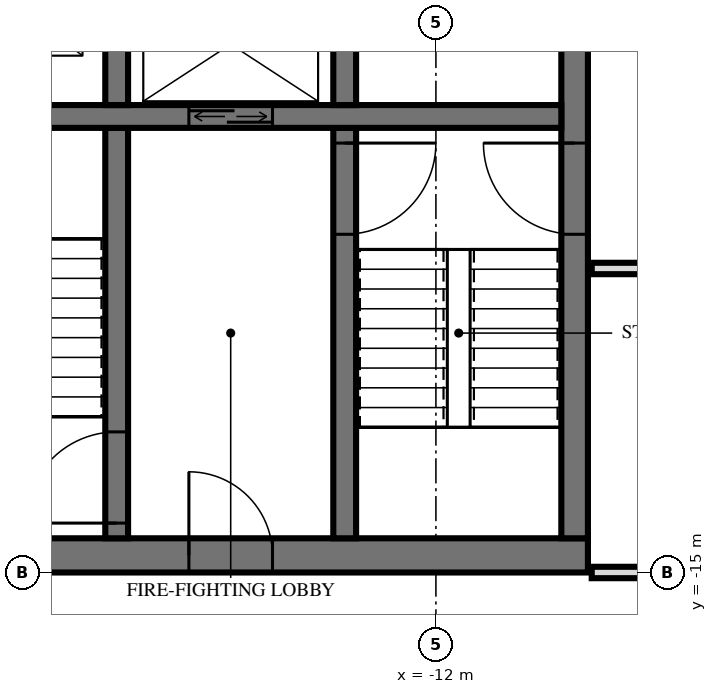
"""IFC4 building model, lengths in metres.
Left out: names, types, materials, properties, quantities, classifications, styles, units other than length and angle.
Written with IfcOpenShell. Run it as: python <this file> out.ifc"""

import sys

from ifc_helpers import new_model, si_unit, direction, frame, frame_2d, origin, place, context, subcontext, project, spatial, rectangle, extrude, element, fill, save


model = new_model("IFC4")
c1 = context("Model", 3, precision=1e-05, world=origin(), true_north=direction((0.0, 1.0)))
c2 = subcontext(c1, "Body", "Model", "MODEL_VIEW")
j1 = project(units=[si_unit("LENGTHUNIT", "METRE"), si_unit("PLANEANGLEUNIT", "RADIAN")], contexts=[c1])
p1 = place(None, origin())
s1 = spatial("IfcSite", under=j1, at=p1, CompositionType="ELEMENT")
p2 = place(p1, origin())
s2 = spatial("IfcBuilding", under=s1, at=p2, CompositionType="ELEMENT")
p3 = place(p2, frame((0.0, 0.0, 99.6)))
s3 = spatial("IfcBuildingStorey", under=s2, at=p3, CompositionType="ELEMENT", Elevation=99.6)
p4 = place(p3, frame((-29.5, -14.775, 0.0), z_axis=(0.0, 0.0, 1.0), x_axis=(1.0, 0.0, 0.0)))
e1 = element("IfcWall", 1, at=p4, inside=s3, PredefinedType="SHEAR", context=c2, shape_type="SweptSolid", body=[
    extrude(rectangle(XDim=19.5, YDim=0.45, at=frame_2d((9.75, 0.0))), origin(), (0.0, 0.0, 1.0), 3.6),
])
p5 = place(p4, frame((11.2, 0.0, 0.0)))
e2 = element("IfcOpeningElement", 2, at=p5, cuts=e1, PredefinedType="OPENING", context=c2, shape_type="SweptSolid", body=[
    extrude(rectangle(XDim=1.2, YDim=2.1, at=frame_2d((0.6, 1.05))), frame((0.0, 0.235, 0.0), z_axis=(0.0, -1.0, 0.0), x_axis=(1.0, 0.0, 0.0)), (0.0, 0.0, 1.0), 0.47),
])
p6 = place(p4, frame((14.25, 0.0, 0.0)))
e3 = element("IfcOpeningElement", 3, at=p6, cuts=e1, PredefinedType="OPENING", context=c2, shape_type="SweptSolid", body=[
    extrude(rectangle(XDim=1.1, YDim=2.1, at=frame_2d((0.55, 1.05))), frame((0.0, 0.235, 0.0), z_axis=(0.0, -1.0, 0.0), x_axis=(1.0, 0.0, 0.0)), (0.0, 0.0, 1.0), 0.47),
])
p7 = place(p4, frame((8.5, 0.0, 0.0)))
e4 = element("IfcOpeningElement", 4, at=p7, cuts=e1, PredefinedType="OPENING", context=c2, shape_type="SweptSolid", body=[
    extrude(rectangle(XDim=0.9, YDim=2.1, at=frame_2d((0.45, 1.05))), frame((0.0, 0.235, 0.0), z_axis=(0.0, -1.0, 0.0), x_axis=(1.0, 0.0, 0.0)), (0.0, 0.0, 1.0), 0.47),
])
p8 = place(p4, frame((6.05, 0.0, 0.0)))
e5 = element("IfcOpeningElement", 5, at=p8, cuts=e1, PredefinedType="OPENING", context=c2, shape_type="SweptSolid", body=[
    extrude(rectangle(XDim=1.0, YDim=2.1, at=frame_2d((0.5, 1.05))), frame((0.0, 0.235, 0.0), z_axis=(0.0, -1.0, 0.0), x_axis=(1.0, 0.0, 0.0)), (0.0, 0.0, 1.0), 0.47),
])
p9 = place(p4, frame((3.413, 0.0, 0.0)))
e6 = element("IfcOpeningElement", 6, at=p9, cuts=e1, PredefinedType="OPENING", context=c2, shape_type="SweptSolid", body=[
    extrude(rectangle(XDim=1.0, YDim=2.1, at=frame_2d((0.5, 1.05))), frame((0.0, 0.235, 0.0), z_axis=(0.0, -1.0, 0.0), x_axis=(1.0, 0.0, 0.0)), (0.0, 0.0, 1.0), 0.47),
])
p10 = place(p4, frame((1.087, 0.0, 0.0)))
e7 = element("IfcOpeningElement", 7, at=p10, cuts=e1, PredefinedType="OPENING", context=c2, shape_type="SweptSolid", body=[
    extrude(rectangle(XDim=1.0, YDim=2.1, at=frame_2d((0.5, 1.05))), frame((0.0, 0.235, 0.0), z_axis=(0.0, -1.0, 0.0), x_axis=(1.0, 0.0, 0.0)), (0.0, 0.0, 1.0), 0.47),
])
p11 = place(p3, frame((-10.175, -14.55, 0.0), z_axis=(0.0, 0.0, 1.0), x_axis=(0.0, 1.0, 0.0)))
e8 = element("IfcWall", 8, at=p11, inside=s3, PredefinedType="SHEAR", context=c2, shape_type="SweptSolid", body=[
    extrude(rectangle(XDim=14.1, YDim=0.35, at=frame_2d((7.05, 0.0))), origin(), (0.0, 0.0, 1.0), 3.6),
])
p12 = place(p11, frame((8.4, 0.0, 0.0)))
e9 = element("IfcOpeningElement", 9, at=p12, cuts=e8, PredefinedType="OPENING", context=c2, shape_type="SweptSolid", body=[
    extrude(rectangle(XDim=1.4, YDim=2.4, at=frame_2d((0.7, 1.2))), frame((0.0, 0.185, 0.0), z_axis=(0.0, -1.0, 0.0), x_axis=(1.0, 0.0, 0.0)), (0.0, 0.0, 1.0), 0.37),
])
p13 = place(p11, frame((10.0, 0.0, 0.0)))
e10 = element("IfcOpeningElement", 10, at=p13, cuts=e8, PredefinedType="OPENING", context=c2, shape_type="SweptSolid", body=[
    extrude(rectangle(XDim=1.4, YDim=2.4, at=frame_2d((0.7, 1.2))), frame((0.0, 0.185, 0.0), z_axis=(0.0, -1.0, 0.0), x_axis=(1.0, 0.0, 0.0)), (0.0, 0.0, 1.0), 0.37),
])
p14 = place(p11, frame((4.0, 0.0, 0.0)))
e11 = element("IfcOpeningElement", 11, at=p14, cuts=e8, PredefinedType="OPENING", context=c2, shape_type="SweptSolid", body=[
    extrude(rectangle(XDim=1.2, YDim=2.1, at=frame_2d((0.6, 1.05))), frame((0.0, 0.185, 0.0), z_axis=(0.0, -1.0, 0.0), x_axis=(1.0, 0.0, 0.0)), (0.0, 0.0, 1.0), 0.37),
])
p15 = place(p3, frame((-29.05, -9.0, 0.0), z_axis=(0.0, 0.0, 1.0), x_axis=(1.0, 0.0, 0.0)))
e12 = element("IfcWall", 12, at=p15, inside=s3, PredefinedType="SHEAR", context=c2, shape_type="SweptSolid", body=[
    extrude(rectangle(XDim=18.7, YDim=0.3, at=frame_2d((9.35, 0.0))), origin(), (0.0, 0.0, 1.0), 3.6),
])
p16 = place(p15, frame((13.8, 0.0, 0.0)))
e13 = element("IfcOpeningElement", 13, at=p16, cuts=e12, PredefinedType="OPENING", context=c2, shape_type="SweptSolid", body=[
    extrude(rectangle(XDim=1.1, YDim=2.1, at=frame_2d((0.55, 1.05))), frame((0.0, 0.16, 0.0), z_axis=(0.0, -1.0, 0.0), x_axis=(1.0, 0.0, 0.0)), (0.0, 0.0, 1.0), 0.32),
])
p17 = place(p3, frame((-13.2, -8.85, 0.0), z_axis=(0.0, 0.0, 1.0), x_axis=(0.0, 1.0, 0.0)))
e14 = element("IfcWall", 14, at=p17, inside=s3, PredefinedType="SHEAR", context=c2, shape_type="SweptSolid", body=[
    extrude(rectangle(XDim=2.3, YDim=0.3, at=frame_2d((1.15, 0.0))), origin(), (0.0, 0.0, 1.0), 3.6),
])
p18 = place(p3, frame((-13.2, -14.55, 0.0), z_axis=(0.0, 0.0, 1.0), x_axis=(0.0, 1.0, 0.0)))
e15 = element("IfcWall", 15, at=p18, inside=s3, PredefinedType="SHEAR", context=c2, shape_type="SweptSolid", body=[
    extrude(rectangle(XDim=5.4, YDim=0.3, at=frame_2d((2.7, 0.0))), origin(), (0.0, 0.0, 1.0), 3.6),
])
p19 = place(p18, frame((4.0, 0.0, 0.0)))
e16 = element("IfcOpeningElement", 16, at=p19, cuts=e15, PredefinedType="OPENING", context=c2, shape_type="SweptSolid", body=[
    extrude(rectangle(XDim=1.2, YDim=2.1, at=frame_2d((0.6, 1.05))), frame((0.0, 0.16, 0.0), z_axis=(0.0, -1.0, 0.0), x_axis=(1.0, 0.0, 0.0)), (0.0, 0.0, 1.0), 0.32),
])
p20 = place(p3, frame((-16.2, -8.85, 0.0), z_axis=(0.0, 0.0, 1.0), x_axis=(0.0, 1.0, 0.0)))
e17 = element("IfcWall", 17, at=p20, inside=s3, PredefinedType="SHEAR", context=c2, shape_type="SweptSolid", body=[
    extrude(rectangle(XDim=2.3, YDim=0.3, at=frame_2d((1.15, 0.0))), origin(), (0.0, 0.0, 1.0), 3.6),
])
p21 = place(p3, frame((-16.2, -14.55, 0.0), z_axis=(0.0, 0.0, 1.0), x_axis=(0.0, 1.0, 0.0)))
e18 = element("IfcWall", 18, at=p21, inside=s3, PredefinedType="SHEAR", context=c2, shape_type="SweptSolid", body=[
    extrude(rectangle(XDim=5.4, YDim=0.3, at=frame_2d((2.7, 0.0))), origin(), (0.0, 0.0, 1.0), 3.6),
])
p22 = place(p21, frame((0.2, 0.0, 0.0)))
e19 = element("IfcOpeningElement", 19, at=p22, cuts=e18, PredefinedType="OPENING", context=c2, shape_type="SweptSolid", body=[
    extrude(rectangle(XDim=1.2, YDim=2.1, at=frame_2d((0.6, 1.05))), frame((0.0, 0.16, 0.0), z_axis=(0.0, -1.0, 0.0), x_axis=(1.0, 0.0, 0.0)), (0.0, 0.0, 1.0), 0.32),
])
p23 = place(p3, frame((-9.95, -15.0, 0.0), z_axis=(0.0, 0.0, 1.0), x_axis=(1.0, 0.0, 0.0)))
e20 = element("IfcWall", 20, at=p23, inside=s3, PredefinedType="PARTITIONING", context=c2, shape_type="SweptSolid", body=[
    extrude(rectangle(XDim=19.9, YDim=0.15, at=frame_2d((9.95, 0.0))), origin(), (0.0, 0.0, 1.0), 2.684),
])
p24 = place(p23, frame((9.45, 0.0, 0.0)))
e21 = element("IfcOpeningElement", 21, at=p24, cuts=e20, PredefinedType="OPENING", context=c2, shape_type="SweptSolid", body=[
    extrude(rectangle(XDim=1.0, YDim=2.1, at=frame_2d((0.5, 1.05))), frame((0.0, 0.085, 0.0), z_axis=(0.0, -1.0, 0.0), x_axis=(1.0, 0.0, 0.0)), (0.0, 0.0, 1.0), 0.17),
])
p25 = place(p3, frame((-9.95, -11.0, 0.0), z_axis=(0.0, 0.0, 1.0), x_axis=(1.0, 0.0, 0.0)))
e22 = element("IfcWall", 22, at=p25, inside=s3, PredefinedType="PARTITIONING", context=c2, shape_type="SweptSolid", body=[
    extrude(rectangle(XDim=19.9, YDim=0.15, at=frame_2d((9.95, 0.0))), origin(), (0.0, 0.0, 1.0), 3.32),
])
p26 = place(p25, frame((9.45, 0.0, 0.0)))
e23 = element("IfcOpeningElement", 23, at=p26, cuts=e22, PredefinedType="OPENING", context=c2, shape_type="SweptSolid", body=[
    extrude(rectangle(XDim=1.0, YDim=2.1, at=frame_2d((0.5, 1.05))), frame((0.0, 0.085, 0.0), z_axis=(0.0, -1.0, 0.0), x_axis=(1.0, 0.0, 0.0)), (0.0, 0.0, 1.0), 0.17),
])
p27 = place(p25, frame((3.45, 0.0, 0.0)))
e24 = element("IfcOpeningElement", 24, at=p27, cuts=e22, PredefinedType="OPENING", context=c2, shape_type="SweptSolid", body=[
    extrude(rectangle(XDim=1.0, YDim=2.1, at=frame_2d((0.5, 1.05))), frame((0.0, 0.085, 0.0), z_axis=(0.0, -1.0, 0.0), x_axis=(1.0, 0.0, 0.0)), (0.0, 0.0, 1.0), 0.17),
])
p28 = place(p16, origin())
e25 = element("IfcDoor", 25, at=p28, inside=s3, OperationType="DOUBLE_DOOR_SLIDING", PredefinedType="USERDEFINED", context=c2, shape_type="SweptSolid", body=[
    extrude(rectangle(XDim=1.1, YDim=2.1, at=frame_2d((0.55, 1.05))), frame((0.0, 0.025, 0.0), z_axis=(0.0, -1.0, 0.0), x_axis=(1.0, 0.0, 0.0)), (0.0, 0.0, 1.0), 0.05),
])
fill(e13, e25)
p29 = place(p14, origin())
e26 = element("IfcDoor", 26, at=p29, inside=s3, OperationType="SINGLE_SWING_LEFT", PredefinedType="DOOR", context=c2, shape_type="SweptSolid", body=[
    extrude(rectangle(XDim=1.2, YDim=2.1, at=frame_2d((0.6, 1.05))), frame((0.0, 0.025, 0.0), z_axis=(0.0, -1.0, 0.0), x_axis=(1.0, 0.0, 0.0)), (0.0, 0.0, 1.0), 0.05),
])
fill(e11, e26)
p30 = place(p6, origin())
e27 = element("IfcDoor", 27, at=p30, inside=s3, OperationType="SINGLE_SWING_RIGHT", PredefinedType="DOOR", context=c2, shape_type="SweptSolid", body=[
    extrude(rectangle(XDim=1.1, YDim=2.1, at=frame_2d((0.55, 1.05))), frame((0.0, 0.025, 0.0), z_axis=(0.0, -1.0, 0.0), x_axis=(1.0, 0.0, 0.0)), (0.0, 0.0, 1.0), 0.05),
])
fill(e3, e27)
p31 = place(p19, frame((0.6, 0.0, 0.0), z_axis=(0.0, 0.0, 1.0), x_axis=(-1.0, 0.0, 0.0)))
e28 = element("IfcDoor", 28, at=p31, inside=s3, OperationType="SINGLE_SWING_RIGHT", PredefinedType="DOOR", context=c2, shape_type="SweptSolid", body=[
    extrude(rectangle(XDim=1.2, YDim=2.1, at=frame_2d((0.0, 1.05))), frame((0.0, -0.025, 0.0), z_axis=(0.0, 1.0, 0.0), x_axis=(-1.0, 0.0, 0.0)), (0.0, 0.0, 1.0), 0.05),
])
fill(e16, e28)
p32 = place(p22, origin())
e29 = element("IfcDoor", 29, at=p32, inside=s3, OperationType="SINGLE_SWING_RIGHT", PredefinedType="DOOR", context=c2, shape_type="SweptSolid", body=[
    extrude(rectangle(XDim=1.2, YDim=2.1, at=frame_2d((0.6, 1.05))), frame((0.0, 0.025, 0.0), z_axis=(0.0, -1.0, 0.0), x_axis=(1.0, 0.0, 0.0)), (0.0, 0.0, 1.0), 0.05),
])
fill(e19, e29)
save(model, sys.argv[1])
